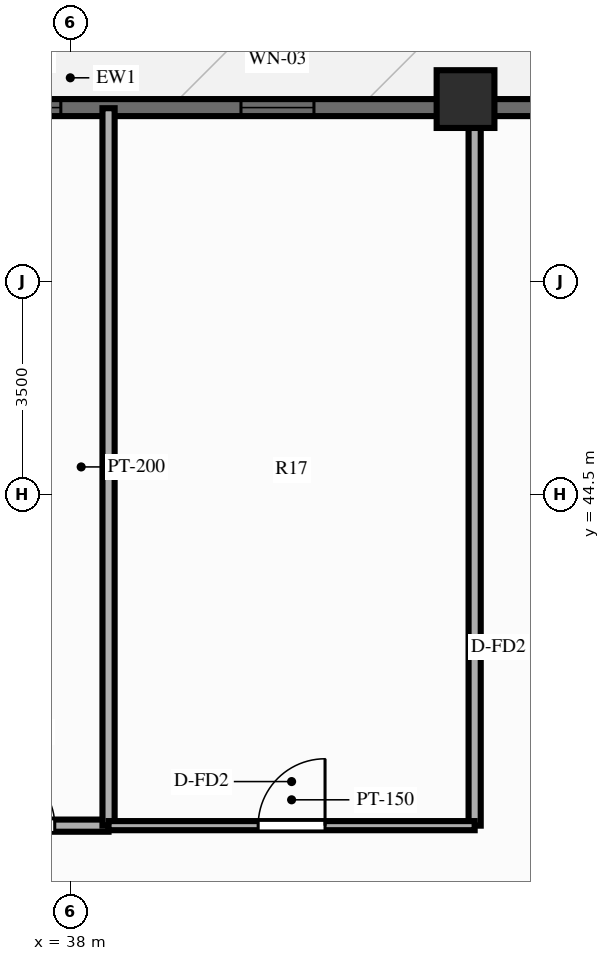
"""IFC4 building model, lengths in metres.
Left out: names, types, materials, properties, quantities, classifications, styles, units other than length and angle.
Written with IfcOpenShell. Run it as: python <this file> out.ifc"""

import sys

from ifc_helpers import new_model, si_unit, direction, frame, frame_2d, origin, origin_2d, place, context, subcontext, project, spatial, rectangle, extrude, source, transform, mapped, element, fill, save


model = new_model("IFC4")
c1 = context("Model", 3, precision=1e-05, world=origin(), true_north=direction((0.0, 1.0)))
c2 = subcontext(c1, "Body", "Model", "MODEL_VIEW")
j1 = project(units=[si_unit("LENGTHUNIT", "METRE"), si_unit("PLANEANGLEUNIT", "RADIAN")], contexts=[c1])
p1 = place(None, origin())
s1 = spatial("IfcSite", under=j1, at=p1, CompositionType="ELEMENT")
p2 = place(p1, origin())
s2 = spatial("IfcBuilding", under=s1, at=p2, CompositionType="ELEMENT")
p3 = place(p2, frame((0.0, 0.0, 138.75)))
s3 = spatial("IfcBuildingStorey", under=s2, at=p3, CompositionType="ELEMENT", Elevation=138.75)
m1 = source(origin(), c2, "Body", "SweptSolid", [
    extrude(rectangle(XDim=0.95, YDim=0.95, at=origin_2d()), origin(), (0.0, 0.0, 1.0), 3.0),
])
p4 = place(p3, frame((44.5, 51.0, 0.0), z_axis=(0.0, 0.0, 1.0), x_axis=(1.0, 0.0, 0.0)))
e1 = element("IfcColumn", 1, at=p4, inside=s3, PredefinedType="COLUMN", context=c2, shape_type="MappedRepresentation", body=[
    mapped(m1, transform((0.0, 0.0, 0.0), scale=1.0)),
])
p5 = place(p3, frame((16.2, 50.86, 0.0), z_axis=(0.0, 0.0, 1.0), x_axis=(1.0, 0.0, 0.0)))
e2 = element("IfcWall", 2, at=p5, inside=s3, PredefinedType="SOLIDWALL", context=c2, shape_type="SweptSolid", body=[
    extrude(rectangle(XDim=43.6, YDim=0.28, at=frame_2d((21.8, 0.0))), origin(), (0.0, 0.0, 1.0), 2.28),
])
p6 = place(p5, frame((7.1, 0.0, 0.0)))
e3 = element("IfcOpeningElement", 3, at=p6, cuts=e2, PredefinedType="OPENING", context=c2, shape_type="SweptSolid", body=[
    extrude(rectangle(XDim=1.1, YDim=2.15, at=frame_2d((0.55, 1.075))), frame((0.0, 0.152, 0.0), z_axis=(0.0, -1.0, 0.0), x_axis=(1.0, 0.0, 0.0)), (0.0, 0.0, 1.0), 0.304),
])
p7 = place(p5, frame((15.982, 0.0, 0.25)))
e4 = element("IfcOpeningElement", 4, at=p7, cuts=e2, PredefinedType="OPENING", context=c2, shape_type="SweptSolid", body=[
    extrude(rectangle(XDim=0.95, YDim=1.5, at=frame_2d((0.475, 0.75))), frame((0.0, 0.152, 0.0), z_axis=(0.0, -1.0, 0.0), x_axis=(1.0, 0.0, 0.0)), (0.0, 0.0, 1.0), 0.304),
])
p8 = place(p5, frame((17.88, 0.0, 0.25)))
e5 = element("IfcOpeningElement", 5, at=p8, cuts=e2, PredefinedType="OPENING", context=c2, shape_type="SweptSolid", body=[
    extrude(rectangle(XDim=1.2, YDim=1.5, at=frame_2d((0.6, 0.75))), frame((0.0, 0.152, 0.0), z_axis=(0.0, -1.0, 0.0), x_axis=(1.0, 0.0, 0.0)), (0.0, 0.0, 1.0), 0.304),
])
p9 = place(p5, frame((20.444, 0.0, 0.25)))
e6 = element("IfcOpeningElement", 6, at=p9, cuts=e2, PredefinedType="OPENING", context=c2, shape_type="SweptSolid", body=[
    extrude(rectangle(XDim=1.2, YDim=1.5, at=frame_2d((0.6, 0.75))), frame((0.0, 0.152, 0.0), z_axis=(0.0, -1.0, 0.0), x_axis=(1.0, 0.0, 0.0)), (0.0, 0.0, 1.0), 0.304),
])
p10 = place(p5, frame((24.607, 0.0, 0.25)))
e7 = element("IfcOpeningElement", 7, at=p10, cuts=e2, PredefinedType="OPENING", context=c2, shape_type="SweptSolid", body=[
    extrude(rectangle(XDim=1.2, YDim=1.5, at=frame_2d((0.6, 0.75))), frame((0.0, 0.152, 0.0), z_axis=(0.0, -1.0, 0.0), x_axis=(1.0, 0.0, 0.0)), (0.0, 0.0, 1.0), 0.304),
])
p11 = place(p5, frame((35.35, 0.0, 0.25)))
e8 = element("IfcOpeningElement", 8, at=p11, cuts=e2, PredefinedType="OPENING", context=c2, shape_type="SweptSolid", body=[
    extrude(rectangle(XDim=1.2, YDim=1.5, at=frame_2d((0.6, 0.75))), frame((0.0, 0.152, 0.0), z_axis=(0.0, -1.0, 0.0), x_axis=(1.0, 0.0, 0.0)), (0.0, 0.0, 1.0), 0.304),
])
p12 = place(p3, frame((44.65, 39.05, 0.0), z_axis=(0.0, 0.0, 1.0), x_axis=(0.0, 1.0, 0.0)))
e9 = element("IfcWall", 9, at=p12, inside=s3, PredefinedType="PARTITIONING", context=c2, shape_type="SweptSolid", body=[
    extrude(rectangle(XDim=11.8, YDim=0.2, at=frame_2d((5.9, 0.0))), origin(), (0.0, 0.0, 1.0), 2.34),
])
p13 = place(p3, frame((35.859, 39.05, 0.0), z_axis=(0.0, 0.0, 1.0), x_axis=(1.0, 0.0, 0.0)))
e10 = element("IfcWall", 10, at=p13, inside=s3, PredefinedType="PARTITIONING", context=c2, shape_type="SweptSolid", body=[
    extrude(rectangle(XDim=2.77, YDim=0.2, at=frame_2d((1.385, 0.0))), origin(), (0.0, 0.0, 1.0), 2.79),
])
p14 = place(p13, frame((0.885, 0.0, 0.0)))
e11 = element("IfcOpeningElement", 11, at=p14, cuts=e10, PredefinedType="OPENING", context=c2, shape_type="SweptSolid", body=[
    extrude(rectangle(XDim=1.0, YDim=2.15, at=frame_2d((0.5, 1.075))), frame((0.0, 0.112, 0.0), z_axis=(0.0, -1.0, 0.0), x_axis=(1.0, 0.0, 0.0)), (0.0, 0.0, 1.0), 0.224),
])
p15 = place(p3, frame((38.629, 39.05, 0.0), z_axis=(0.0, 0.0, 1.0), x_axis=(0.0, 1.0, 0.0)))
e12 = element("IfcWall", 12, at=p15, inside=s3, PredefinedType="PARTITIONING", context=c2, shape_type="SweptSolid", body=[
    extrude(rectangle(XDim=11.8, YDim=0.2, at=frame_2d((5.9, 0.0))), origin(), (0.0, 0.0, 1.0), 2.79),
])
p16 = place(p3, frame((38.629, 39.05, 0.0), z_axis=(0.0, 0.0, 1.0), x_axis=(1.0, 0.0, 0.0)))
e13 = element("IfcWall", 13, at=p16, inside=s3, PredefinedType="PARTITIONING", context=c2, shape_type="SweptSolid", body=[
    extrude(rectangle(XDim=6.021, YDim=0.15, at=frame_2d((3.01, 0.0))), origin(), (0.0, 0.0, 1.0), 2.79),
])
p17 = place(p16, frame((2.46, 0.0, 0.0)))
e14 = element("IfcOpeningElement", 14, at=p17, cuts=e13, PredefinedType="OPENING", context=c2, shape_type="SweptSolid", body=[
    extrude(rectangle(XDim=1.1, YDim=2.15, at=frame_2d((0.55, 1.075))), frame((0.0, 0.087, 0.0), z_axis=(0.0, -1.0, 0.0), x_axis=(1.0, 0.0, 0.0)), (0.0, 0.0, 1.0), 0.174),
])
m2 = source(origin(), c2, "Body", "SweptSolid", [
    extrude(rectangle(XDim=1.2, YDim=1.5, at=frame_2d((0.6, 0.75))), frame((0.0, 0.03, 0.0), z_axis=(0.0, -1.0, 0.0), x_axis=(1.0, 0.0, 0.0)), (0.0, 0.0, 1.0), 0.06),
])
p18 = place(p9, origin())
e15 = element("IfcWindow", 15, at=p18, inside=s3, PartitioningType="SINGLE_PANEL", PredefinedType="WINDOW", context=c2, shape_type="MappedRepresentation", body=[
    mapped(m2, transform((0.0, 0.0, 0.0), scale=1.0)),
])
fill(e6, e15)
p19 = place(p10, origin())
e16 = element("IfcWindow", 16, at=p19, inside=s3, PartitioningType="SINGLE_PANEL", PredefinedType="WINDOW", context=c2, shape_type="MappedRepresentation", body=[
    mapped(m2, transform((0.0, 0.0, 0.0), scale=1.0)),
])
fill(e7, e16)
m3 = source(origin(), c2, "Body", "SweptSolid", [
    extrude(rectangle(XDim=1.0, YDim=2.15, at=frame_2d((0.5, 1.075))), frame((0.0, 0.025, 0.0), z_axis=(0.0, -1.0, 0.0), x_axis=(1.0, 0.0, 0.0)), (0.0, 0.0, 1.0), 0.05),
])
p20 = place(p14, origin())
e17 = element("IfcDoor", 17, at=p20, inside=s3, OperationType="SINGLE_SWING_LEFT", PredefinedType="DOOR", context=c2, shape_type="MappedRepresentation", body=[
    mapped(m3, transform((0.0, 0.0, 0.0), scale=1.0)),
])
fill(e11, e17)
m4 = source(origin(), c2, "Body", "SweptSolid", [
    extrude(rectangle(XDim=1.1, YDim=2.15, at=frame_2d((0.55, 1.075))), frame((0.0, 0.025, 0.0), z_axis=(0.0, -1.0, 0.0), x_axis=(1.0, 0.0, 0.0)), (0.0, 0.0, 1.0), 0.05),
])
p21 = place(p17, origin())
e18 = element("IfcDoor", 18, at=p21, inside=s3, OperationType="SINGLE_SWING_RIGHT", PredefinedType="DOOR", context=c2, shape_type="MappedRepresentation", body=[
    mapped(m4, transform((0.0, 0.0, 0.0), scale=1.0)),
])
fill(e14, e18)
save(model, sys.argv[1])
